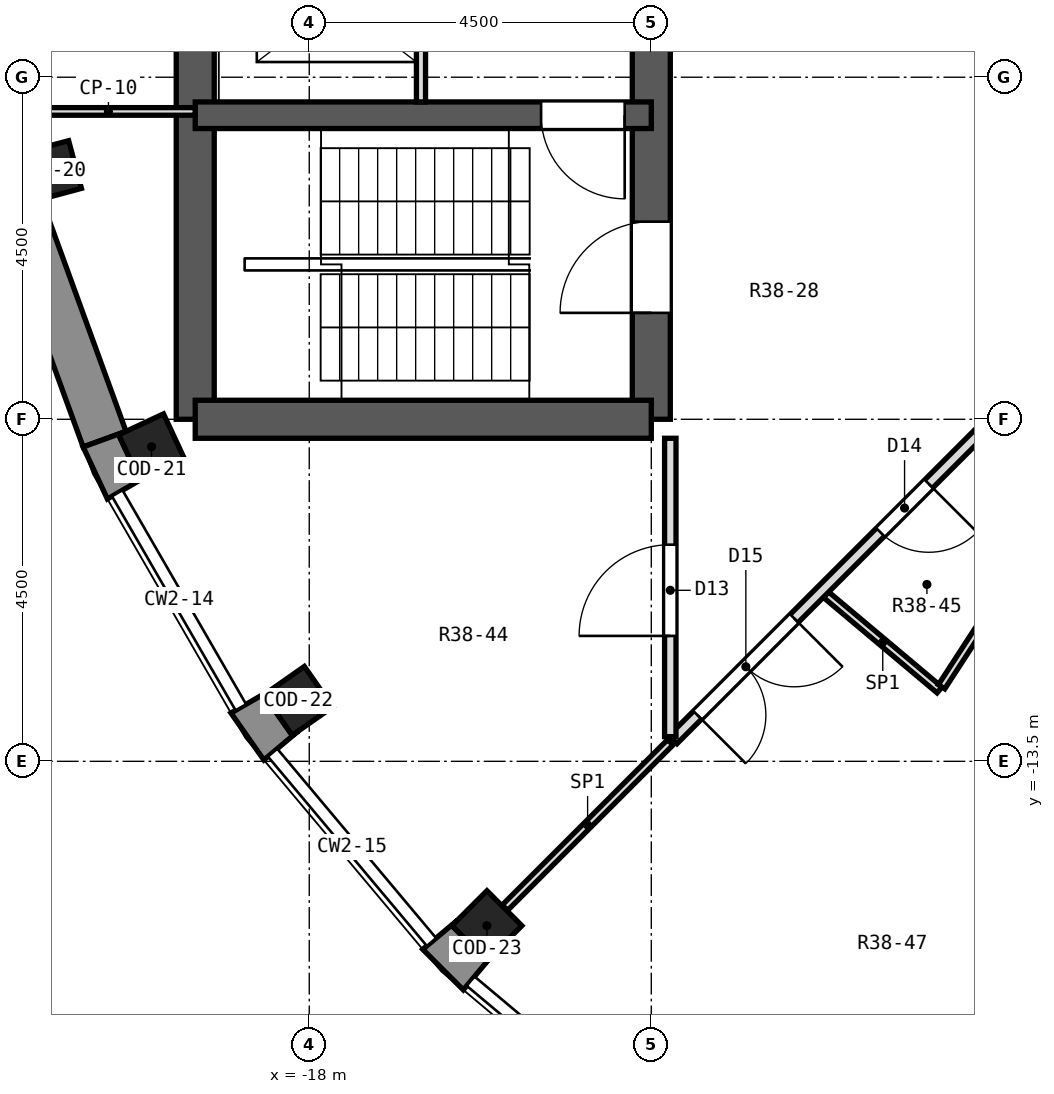
"""IFC4 building model, lengths in metres.
Left out: names, types, materials, properties, quantities, classifications, styles, units other than length and angle.
Written with IfcOpenShell. Run it as: python <this file> out.ifc"""

import sys

from ifc_helpers import new_model, si_unit, direction, frame, frame_2d, origin, origin_2d, place, context, subcontext, project, spatial, polyline, rectangle, outline, extrude, element, fill, save


model = new_model("IFC4")
c1 = context("Model", 3, precision=1e-05, world=origin(), true_north=direction((0.0, 1.0)))
c2 = subcontext(c1, "Body", "Model", "MODEL_VIEW")
j1 = project(units=[si_unit("LENGTHUNIT", "METRE"), si_unit("PLANEANGLEUNIT", "RADIAN")], contexts=[c1])
p1 = place(None, origin())
s1 = spatial("IfcSite", under=j1, at=p1, CompositionType="ELEMENT")
p2 = place(p1, origin())
s2 = spatial("IfcBuilding", under=s1, at=p2, CompositionType="ELEMENT")
p3 = place(p2, frame((0.0, 0.0, 279.2)))
s3 = spatial("IfcBuildingStorey", under=s2, at=p3, CompositionType="ELEMENT", Elevation=279.2)
for number, where, z_axis, x_axis in (
    (1, (-21.395, -5.733, 0.0), (0.0, 0.0, 1.0), (-0.966, -0.259, 0.0)),
    (2, (-20.075, -9.361, 0.0), (0.0, 0.0, 1.0), (-0.906, -0.423, 0.0)),
    (3, (-18.144, -12.705, 0.0), (0.0, 0.0, 1.0), (-0.819, -0.574, 0.0)),
    (4, (-15.662, -15.662, 0.0), (0.0, 0.0, 1.0), (-0.707, -0.707, 0.0)),
):
    element("IfcColumn", number, at=place(p3, frame(where, z_axis=z_axis, x_axis=x_axis)), inside=s3, PredefinedType="COLUMN", context=c2, shape_type="SweptSolid", body=[
        extrude(rectangle(XDim=0.65, YDim=0.65, at=origin_2d()), origin(), (0.0, 0.0, 1.0), 5.0),
    ])
p4 = place(p3, frame((-13.5, -9.0, 0.0), z_axis=(0.0, 0.0, 1.0), x_axis=(0.0, 1.0, 0.0)))
e5 = element("IfcWall", 5, at=p4, inside=s3, PredefinedType="SHEAR", context=c2, shape_type="SweptSolid", body=[
    extrude(rectangle(XDim=18.0, YDim=0.5, at=frame_2d((9.0, 0.0))), origin(), (0.0, 0.0, 1.0), 5.0),
])
p5 = place(p4, frame((15.4, 0.0, 0.0)))
e6 = element("IfcOpeningElement", 6, at=p5, cuts=e5, PredefinedType="OPENING", context=c2, shape_type="SweptSolid", body=[
    extrude(rectangle(XDim=1.2, YDim=2.1, at=frame_2d((0.6, 1.05))), frame((0.0, 0.262, 0.0), z_axis=(0.0, -1.0, 0.0), x_axis=(1.0, 0.0, 0.0)), (0.0, 0.0, 1.0), 0.524),
])
p6 = place(p4, frame((1.4, 0.0, 0.0)))
e7 = element("IfcOpeningElement", 7, at=p6, cuts=e5, PredefinedType="OPENING", context=c2, shape_type="SweptSolid", body=[
    extrude(rectangle(XDim=1.2, YDim=2.1, at=frame_2d((0.6, 1.05))), frame((0.0, 0.262, 0.0), z_axis=(0.0, -1.0, 0.0), x_axis=(1.0, 0.0, 0.0)), (0.0, 0.0, 1.0), 0.524),
])
p7 = place(p4, frame((7.5, 0.0, 0.0)))
e8 = element("IfcOpeningElement", 8, at=p7, cuts=e5, PredefinedType="OPENING", context=c2, shape_type="SweptSolid", body=[
    extrude(rectangle(XDim=3.0, YDim=2.4, at=frame_2d((1.5, 1.2))), frame((0.0, 0.262, 0.0), z_axis=(0.0, -1.0, 0.0), x_axis=(1.0, 0.0, 0.0)), (0.0, 0.0, 1.0), 0.524),
])
p8 = place(p3, frame((-19.5, -9.0, 0.0), z_axis=(0.0, 0.0, 1.0), x_axis=(0.0, 1.0, 0.0)))
e9 = element("IfcWall", 9, at=p8, inside=s3, PredefinedType="SHEAR", context=c2, shape_type="SweptSolid", body=[
    extrude(rectangle(XDim=18.0, YDim=0.5, at=frame_2d((9.0, 0.0))), origin(), (0.0, 0.0, 1.0), 5.0),
])
p9 = place(p8, frame((9.45, 0.0, 0.0)))
e10 = element("IfcOpeningElement", 10, at=p9, cuts=e9, PredefinedType="OPENING", context=c2, shape_type="SweptSolid", body=[
    extrude(rectangle(XDim=0.9, YDim=2.1, at=frame_2d((0.45, 1.05))), frame((0.0, 0.262, 0.0), z_axis=(0.0, -1.0, 0.0), x_axis=(1.0, 0.0, 0.0)), (0.0, 0.0, 1.0), 0.524),
])
p10 = place(p8, frame((7.65, 0.0, 0.0)))
e11 = element("IfcOpeningElement", 11, at=p10, cuts=e9, PredefinedType="OPENING", context=c2, shape_type="SweptSolid", body=[
    extrude(rectangle(XDim=0.9, YDim=2.1, at=frame_2d((0.45, 1.05))), frame((0.0, 0.262, 0.0), z_axis=(0.0, -1.0, 0.0), x_axis=(1.0, 0.0, 0.0)), (0.0, 0.0, 1.0), 0.524),
])
p11 = place(p3, frame((-13.5, -9.0, 0.0), z_axis=(0.0, 0.0, 1.0), x_axis=(-1.0, 0.0, 0.0)))
e12 = element("IfcWall", 12, at=p11, inside=s3, PredefinedType="SHEAR", context=c2, shape_type="SweptSolid", body=[
    extrude(rectangle(XDim=6.0, YDim=0.5, at=frame_2d((3.0, 0.0))), origin(), (0.0, 0.0, 1.0), 5.0),
])
p12 = place(p3, frame((-13.5, -5.0, 0.0), z_axis=(0.0, 0.0, 1.0), x_axis=(-1.0, 0.0, 0.0)))
e13 = element("IfcWall", 13, at=p12, inside=s3, PredefinedType="SHEAR", context=c2, shape_type="SweptSolid", body=[
    extrude(rectangle(XDim=6.0, YDim=0.35, at=frame_2d((3.0, 0.0))), origin(), (0.0, 0.0, 1.0), 5.0),
])
p13 = place(p12, frame((0.35, 0.0, 0.0)))
e14 = element("IfcOpeningElement", 14, at=p13, cuts=e13, PredefinedType="OPENING", context=c2, shape_type="SweptSolid", body=[
    extrude(rectangle(XDim=1.1, YDim=2.1, at=frame_2d((0.55, 1.05))), frame((0.0, 0.187, 0.0), z_axis=(0.0, -1.0, 0.0), x_axis=(1.0, 0.0, 0.0)), (0.0, 0.0, 1.0), 0.374),
])
p14 = place(p3, frame((-21.805, -6.206, 0.0), z_axis=(0.0, 0.0, 1.0), x_axis=(0.342056509473, -0.939679383794, 0.0)))
e15 = element("IfcWall", 15, at=p14, inside=s3, PredefinedType="SOLIDWALL", context=c2, shape_type="SweptSolid", body=[
    extrude(rectangle(XDim=3.252, YDim=0.6, at=frame_2d((1.626, 0.0))), origin(), (0.0, 0.0, 1.0), 4.45),
])
p15 = place(p3, origin())
e16 = element("IfcWall", 16, at=p15, inside=s3, PredefinedType="SOLIDWALL", context=c2, shape_type="SweptSolid", body=[
    extrude(outline(polyline([(-20.975, -9.364), (-20.656, -10.048), (-20.136, -9.748), (-20.232, -9.793), (-20.507, -9.204), (-20.411, -9.159), (-20.975, -9.364)])), origin(), (0.0, 0.0, 1.0), 4.45),
])
p16 = place(p3, origin())
e17 = element("IfcWall", 17, at=p16, inside=s3, PredefinedType="SOLIDWALL", context=c2, shape_type="SweptSolid", body=[
    extrude(outline(polyline([(-19.03, -12.864), (-18.597, -13.482), (-18.137, -13.097), (-18.224, -13.157), (-18.597, -12.625), (-18.51, -12.564), (-19.03, -12.864)])), origin(), (0.0, 0.0, 1.0), 4.45),
])
p17 = place(p3, origin())
e18 = element("IfcWall", 18, at=p17, inside=s3, PredefinedType="SOLIDWALL", context=c2, shape_type="SweptSolid", body=[
    extrude(outline(polyline([(-15.973, -16.507), (-15.588, -16.047), (-15.662, -16.122), (-16.122, -15.662), (-16.047, -15.588), (-16.507, -15.973), (-15.973, -16.507)])), origin(), (0.0, 0.0, 1.0), 4.45),
])
p18 = place(p3, frame((-11.202, -11.307, 0.0), z_axis=(0.0, 0.0, 1.0), x_axis=(0.765897191843, -0.642963056114, 0.0)))
e19 = element("IfcWall", 19, at=p18, inside=s3, PredefinedType="PARTITIONING", context=c2, shape_type="SweptSolid", body=[
    extrude(rectangle(XDim=1.95, YDim=0.1, at=frame_2d((0.975, 0.0))), origin(), (0.0, 0.0, 1.0), 4.45),
])
p19 = place(p3, frame((-15.426, -15.426, 0.0), z_axis=(0.0, 0.0, 1.0), x_axis=(0.707106781187, 0.707106781187, 0.0)))
e20 = element("IfcWall", 20, at=p19, inside=s3, PredefinedType="PARTITIONING", context=c2, shape_type="SweptSolid", body=[
    extrude(rectangle(XDim=3.077, YDim=0.1, at=frame_2d((1.538, 0.0))), origin(), (0.0, 0.0, 1.0), 4.45),
])
p20 = place(p3, frame((-13.215, -13.215, 0.0), z_axis=(0.0, 0.0, 1.0), x_axis=(0.707106781187, 0.707106781187, 0.0)))
e21 = element("IfcWall", 21, at=p20, inside=s3, PredefinedType="PARTITIONING", context=c2, shape_type="SweptSolid", body=[
    extrude(rectangle(XDim=5.777, YDim=0.15, at=frame_2d((2.888, 0.0))), origin(), (0.0, 0.0, 1.0), 4.45),
])
p21 = place(p20, frame((3.859, 0.0, 0.0)))
e22 = element("IfcOpeningElement", 22, at=p21, cuts=e21, PredefinedType="OPENING", context=c2, shape_type="SweptSolid", body=[
    extrude(rectangle(XDim=0.9, YDim=2.1, at=frame_2d((0.45, 1.05))), frame((0.0, 0.087, 0.0), z_axis=(0.0, -1.0, 0.0), x_axis=(1.0, 0.0, 0.0)), (0.0, 0.0, 1.0), 0.174),
])
p22 = place(p20, frame((0.456, 0.0, 0.0)))
e23 = element("IfcOpeningElement", 23, at=p22, cuts=e21, PredefinedType="OPENING", context=c2, shape_type="SweptSolid", body=[
    extrude(rectangle(XDim=1.8, YDim=2.1, at=frame_2d((0.9, 1.05))), frame((0.0, 0.087, 0.0), z_axis=(0.0, -1.0, 0.0), x_axis=(1.0, 0.0, 0.0)), (0.0, 0.0, 1.0), 0.174),
])
p23 = place(p3, frame((-9.681, -12.519, 0.0), z_axis=(0.0, 0.0, 1.0), x_axis=(0.544873455053, 0.838518287206, 0.0)))
e24 = element("IfcWall", 24, at=p23, inside=s3, PredefinedType="PARTITIONING", context=c2, shape_type="SweptSolid", body=[
    extrude(rectangle(XDim=3.212, YDim=0.1, at=frame_2d((1.606, 0.0))), origin(), (0.0, 0.0, 1.0), 4.45),
])
p24 = place(p3, frame((-13.25, -13.175, 0.0), z_axis=(0.0, 0.0, 1.0), x_axis=(0.0, 1.0, 0.0)))
e25 = element("IfcWall", 25, at=p24, inside=s3, PredefinedType="PARTITIONING", context=c2, shape_type="SweptSolid", body=[
    extrude(rectangle(XDim=3.925, YDim=0.15, at=frame_2d((1.962, 0.0))), origin(), (0.0, 0.0, 1.0), 4.45),
])
p25 = place(p24, frame((1.325, 0.0, 0.0)))
e26 = element("IfcOpeningElement", 26, at=p25, cuts=e25, PredefinedType="OPENING", context=c2, shape_type="SweptSolid", body=[
    extrude(rectangle(XDim=1.2, YDim=2.1, at=frame_2d((0.6, 1.05))), frame((0.0, 0.087, 0.0), z_axis=(0.0, -1.0, 0.0), x_axis=(1.0, 0.0, 0.0)), (0.0, 0.0, 1.0), 0.174),
])
p26 = place(p3, frame((-19.5, -4.95, 0.0), z_axis=(0.0, 0.0, 1.0), x_axis=(-1.0, 0.0, 0.0)))
e27 = element("IfcWall", 27, at=p26, inside=s3, PredefinedType="PARTITIONING", context=c2, shape_type="SweptSolid", body=[
    extrude(rectangle(XDim=2.284, YDim=0.1, at=frame_2d((1.142, 0.0))), origin(), (0.0, 0.0, 1.0), 4.45),
])
p27 = place(p3, frame((-16.53, -4.825, 0.0), z_axis=(0.0, 0.0, 1.0), x_axis=(0.0, 1.0, 0.0)))
e28 = element("IfcWall", 28, at=p27, inside=s3, PredefinedType="PARTITIONING", context=c2, shape_type="SweptSolid", body=[
    extrude(rectangle(XDim=2.65, YDim=0.12, at=frame_2d((1.325, 0.0))), origin(), (0.0, 0.0, 1.0), 4.45),
])
p28 = place(p27, frame((0.775, 0.0, 0.0)))
e29 = element("IfcOpeningElement", 29, at=p28, cuts=e28, PredefinedType="OPENING", context=c2, shape_type="SweptSolid", body=[
    extrude(rectangle(XDim=1.1, YDim=2.1, at=frame_2d((0.55, 1.05))), frame((0.0, 0.072, 0.0), z_axis=(0.0, -1.0, 0.0), x_axis=(1.0, 0.0, 0.0)), (0.0, 0.0, 1.0), 0.144),
])
p29 = place(p25, origin())
e30 = element("IfcDoor", 30, at=p29, inside=s3, OperationType="SINGLE_SWING_LEFT", PredefinedType="DOOR", context=c2, shape_type="SweptSolid", body=[
    extrude(rectangle(XDim=1.2, YDim=2.1, at=frame_2d((0.6, 1.05))), frame((0.0, 0.025, 0.0), z_axis=(0.0, -1.0, 0.0), x_axis=(1.0, 0.0, 0.0)), (0.0, 0.0, 1.0), 0.05),
])
fill(e26, e30)
p30 = place(p21, frame((0.9, 0.0, 0.0), z_axis=(0.0, 0.0, 1.0), x_axis=(-1.0, 0.0, 0.0)))
e31 = element("IfcDoor", 31, at=p30, inside=s3, OperationType="SINGLE_SWING_LEFT", PredefinedType="DOOR", context=c2, shape_type="SweptSolid", body=[
    extrude(rectangle(XDim=0.9, YDim=2.1, at=frame_2d((0.45, 1.05))), frame((0.0, 0.025, 0.0), z_axis=(0.0, -1.0, 0.0), x_axis=(1.0, 0.0, 0.0)), (0.0, 0.0, 1.0), 0.05),
])
fill(e22, e31)
p31 = place(p22, frame((1.8, 0.0, 0.0), z_axis=(0.0, 0.0, 1.0), x_axis=(-1.0, 0.0, 0.0)))
e32 = element("IfcDoor", 32, at=p31, inside=s3, OperationType="DOUBLE_DOOR_SINGLE_SWING", PredefinedType="DOOR", context=c2, shape_type="SweptSolid", body=[
    extrude(rectangle(XDim=1.8, YDim=2.1, at=frame_2d((0.9, 1.05))), frame((0.0, 0.025, 0.0), z_axis=(0.0, -1.0, 0.0), x_axis=(1.0, 0.0, 0.0)), (0.0, 0.0, 1.0), 0.05),
])
fill(e23, e32)
p32 = place(p13, origin())
e33 = element("IfcDoor", 33, at=p32, inside=s3, OperationType="SINGLE_SWING_LEFT", PredefinedType="DOOR", context=c2, shape_type="SweptSolid", body=[
    extrude(rectangle(XDim=1.1, YDim=2.1, at=frame_2d((0.55, 1.05))), frame((0.0, 0.025, 0.0), z_axis=(0.0, -1.0, 0.0), x_axis=(1.0, 0.0, 0.0)), (0.0, 0.0, 1.0), 0.05),
])
fill(e14, e33)
p33 = place(p6, origin())
e34 = element("IfcDoor", 34, at=p33, inside=s3, OperationType="SINGLE_SWING_LEFT", PredefinedType="DOOR", context=c2, shape_type="SweptSolid", body=[
    extrude(rectangle(XDim=1.2, YDim=2.1, at=frame_2d((0.6, 1.05))), frame((0.0, 0.025, 0.0), z_axis=(0.0, -1.0, 0.0), x_axis=(1.0, 0.0, 0.0)), (0.0, 0.0, 1.0), 0.05),
])
fill(e7, e34)
save(model, sys.argv[1])
